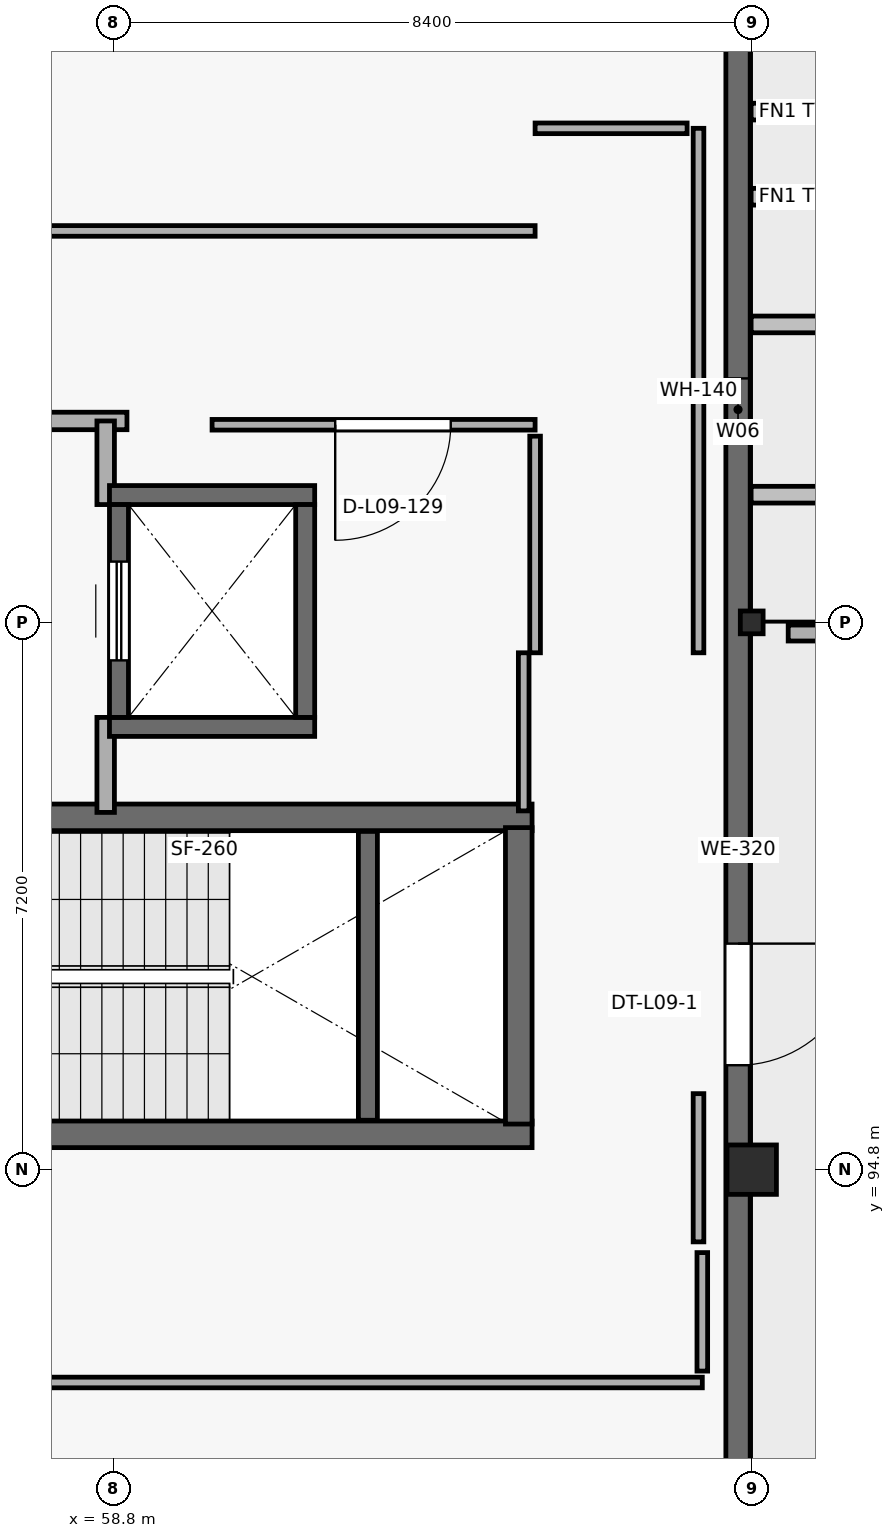
"""IFC4 building model, lengths in metres.
Left out: names, types, materials, properties, quantities, classifications, styles, units other than length and angle.
Written with IfcOpenShell. Run it as: python <this file> out.ifc"""

import sys

from ifc_helpers import new_model, si_unit, direction, frame, frame_2d, origin, origin_2d, place, context, subcontext, project, spatial, rectangle, hollow_rectangle, extrude, element, fill, save


model = new_model("IFC4")
c1 = context("Model", 3, precision=1e-05, world=origin(), true_north=direction((0.0, 1.0)))
c2 = subcontext(c1, "Body", "Model", "MODEL_VIEW")
j1 = project(units=[si_unit("LENGTHUNIT", "METRE"), si_unit("PLANEANGLEUNIT", "RADIAN")], contexts=[c1])
p1 = place(None, origin())
s1 = spatial("IfcSite", under=j1, at=p1, CompositionType="ELEMENT")
p2 = place(p1, origin())
s2 = spatial("IfcBuilding", under=s1, at=p2, CompositionType="ELEMENT")
p3 = place(p2, frame((0.0, 0.0, 40.2)))
s3 = spatial("IfcBuildingStorey", under=s2, at=p3, CompositionType="ELEMENT", Elevation=40.2)
p4 = place(p3, frame((67.2, 94.8, 0.0), z_axis=(0.0, 0.0, 1.0), x_axis=(1.0, 0.0, 0.0)))
e1 = element("IfcColumn", 1, at=p4, inside=s3, PredefinedType="COLUMN", context=c2, shape_type="SweptSolid", body=[
    extrude(rectangle(XDim=0.65, YDim=0.65, at=origin_2d()), origin(), (0.0, 0.0, 1.0), 4.5),
])
p5 = place(p3, frame((67.2, 102.0, 0.0), z_axis=(0.0, 0.0, 1.0), x_axis=(1.0, 0.0, 0.0)))
e2 = element("IfcColumn", 2, at=p5, inside=s3, PredefinedType="COLUMN", context=c2, shape_type="SweptSolid", body=[
    extrude(hollow_rectangle(XDim=0.3, YDim=0.3, WallThickness=0.012, at=origin_2d()), origin(), (0.0, 0.0, 1.0), 4.5),
])
p6 = place(p3, frame((67.02, 110.4, 0.0), z_axis=(0.0, 0.0, 1.0), x_axis=(0.0, -1.0, 0.0)))
e3 = element("IfcWall", 3, at=p6, inside=s3, PredefinedType="SOLIDWALL", context=c2, shape_type="SweptSolid", body=[
    extrude(rectangle(XDim=22.8, YDim=0.32, at=frame_2d((11.4, 0.0))), origin(), (0.0, 0.0, 1.0), 4.24),
])
p7 = place(p6, frame((12.626, 0.0, 0.0)))
e4 = element("IfcOpeningElement", 4, at=p7, cuts=e3, PredefinedType="OPENING", context=c2, shape_type="SweptSolid", body=[
    extrude(rectangle(XDim=1.6, YDim=2.35, at=frame_2d((0.8, 1.175))), frame((0.0, 0.17, 0.0), z_axis=(0.0, -1.0, 0.0), x_axis=(1.0, 0.0, 0.0)), (0.0, 0.0, 1.0), 0.34),
])
p8 = place(p6, frame((5.19, 0.0, 0.75)))
e5 = element("IfcOpeningElement", 5, at=p8, cuts=e3, PredefinedType="OPENING", context=c2, shape_type="SweptSolid", body=[
    extrude(rectangle(XDim=0.82, YDim=1.85, at=frame_2d((0.41, 0.925))), frame((0.0, 0.17, 0.0), z_axis=(0.0, -1.0, 0.0), x_axis=(1.0, 0.0, 0.0)), (0.0, 0.0, 1.0), 0.34),
])
p9 = place(p3, frame((83.87, 101.86, 0.0), z_axis=(0.0, 0.0, 1.0), x_axis=(-1.0, 0.0, 0.0)))
e6 = element("IfcWall", 6, at=p9, inside=s3, PredefinedType="PARAPET", context=c2, shape_type="SweptSolid", body=[
    extrude(rectangle(XDim=16.19, YDim=0.21, at=frame_2d((8.095, 0.0))), origin(), (0.0, 0.0, 1.0), 1.12),
])
p10 = place(p3, frame((55.09, 95.265, 0.0), z_axis=(0.0, 0.0, 1.0), x_axis=(1.0, 0.0, 0.0)))
e7 = element("IfcWall", 7, at=p10, inside=s3, PredefinedType="SHEAR", context=c2, shape_type="SweptSolid", body=[
    extrude(rectangle(XDim=9.22, YDim=0.35, at=frame_2d((4.61, 0.0))), origin(), (0.0, 0.0, 1.0), 4.24),
])
p11 = place(p10, frame((0.45, 0.0, 0.0)))
e8 = element("IfcOpeningElement", 8, at=p11, cuts=e7, PredefinedType="OPENING", context=c2, shape_type="SweptSolid", body=[
    extrude(rectangle(XDim=1.25, YDim=2.2, at=frame_2d((0.625, 1.1))), frame((0.0, 0.185, 0.0), z_axis=(0.0, -1.0, 0.0), x_axis=(1.0, 0.0, 0.0)), (0.0, 0.0, 1.0), 0.37),
])
p12 = place(p3, frame((64.31, 99.435, 0.0), z_axis=(0.0, 0.0, 1.0), x_axis=(-1.0, 0.0, 0.0)))
e9 = element("IfcWall", 9, at=p12, inside=s3, PredefinedType="SHEAR", context=c2, shape_type="SweptSolid", body=[
    extrude(rectangle(XDim=9.22, YDim=0.35, at=frame_2d((4.61, 0.0))), origin(), (0.0, 0.0, 1.0), 4.24),
])
p13 = place(p12, frame((7.72, 0.0, 0.0)))
e10 = element("IfcOpeningElement", 10, at=p13, cuts=e9, PredefinedType="OPENING", context=c2, shape_type="SweptSolid", body=[
    extrude(rectangle(XDim=1.2, YDim=2.2, at=frame_2d((0.6, 1.1))), frame((0.0, 0.185, 0.0), z_axis=(0.0, -1.0, 0.0), x_axis=(1.0, 0.0, 0.0)), (0.0, 0.0, 1.0), 0.37),
])
p14 = place(p3, frame((64.135, 99.3, 0.0), z_axis=(0.0, 0.0, 1.0), x_axis=(0.0, -1.0, 0.0)))
e11 = element("IfcWall", 11, at=p14, inside=s3, PredefinedType="SHEAR", context=c2, shape_type="SweptSolid", body=[
    extrude(rectangle(XDim=3.9, YDim=0.35, at=frame_2d((1.95, 0.0))), origin(), (0.0, 0.0, 1.0), 4.24),
])
p15 = place(p3, frame((62.15, 95.45, 0.0), z_axis=(0.0, 0.0, 1.0), x_axis=(0.0, 1.0, 0.0)))
e12 = element("IfcWall", 12, at=p15, inside=s3, PredefinedType="SHEAR", context=c2, shape_type="SweptSolid", body=[
    extrude(rectangle(XDim=3.8, YDim=0.25, at=frame_2d((1.9, 0.0))), origin(), (0.0, 0.0, 1.0), 2.07),
])
p16 = place(p3, frame((55.09, 104.65, 0.0), z_axis=(0.0, 0.0, 1.0), x_axis=(1.0, 0.0, 0.0)))
e13 = element("IfcWall", 13, at=p16, inside=s3, PredefinedType="PARTITIONING", context=c2, shape_type="SweptSolid", body=[
    extrude(rectangle(XDim=3.89, YDim=0.23, at=frame_2d((1.945, 0.0))), origin(), (0.0, 0.0, 1.0), 4.24),
])
p17 = place(p16, frame((1.15, 0.0, 0.0)))
e14 = element("IfcOpeningElement", 14, at=p17, cuts=e13, PredefinedType="OPENING", context=c2, shape_type="SweptSolid", body=[
    extrude(rectangle(XDim=1.2, YDim=2.2, at=frame_2d((0.6, 1.1))), frame((0.0, 0.125, 0.0), z_axis=(0.0, -1.0, 0.0), x_axis=(1.0, 0.0, 0.0)), (0.0, 0.0, 1.0), 0.25),
])
p18 = place(p3, frame((58.7, 104.65, 0.0), z_axis=(0.0, 0.0, 1.0), x_axis=(0.0, -1.0, 0.0)))
e15 = element("IfcWall", 15, at=p18, inside=s3, PredefinedType="PARTITIONING", context=c2, shape_type="SweptSolid", body=[
    extrude(rectangle(XDim=1.1, YDim=0.23, at=frame_2d((0.55, 0.0))), origin(), (0.0, 0.0, 1.0), 4.24),
])
p19 = place(p3, frame((58.7, 100.75, 0.0), z_axis=(0.0, 0.0, 1.0), x_axis=(0.0, -1.0, 0.0)))
e16 = element("IfcWall", 16, at=p19, inside=s3, PredefinedType="PARTITIONING", context=c2, shape_type="SweptSolid", body=[
    extrude(rectangle(XDim=1.25, YDim=0.23, at=frame_2d((0.625, 0.0))), origin(), (0.0, 0.0, 1.0), 4.24),
])
for number, where, z_axis, x_axis in (
    (17, (58.75, 100.625, 0.0), (0.0, 0.0, 1.0), (1.0, 0.0, 0.0)),
    (18, (61.45, 103.675, 0.0), (0.0, 0.0, 1.0), (-1.0, 0.0, 0.0)),
):
    element("IfcWall", number, at=place(p3, frame(where, z_axis=z_axis, x_axis=x_axis)), inside=s3, PredefinedType="SHEAR", context=c2, shape_type="SweptSolid", body=[
        extrude(rectangle(XDim=2.7, YDim=0.25, at=frame_2d((1.35, 0.0))), origin(), (0.0, 0.0, 1.0), 4.24),
    ])
p20 = place(p3, frame((58.875, 100.75, 0.0), z_axis=(0.0, 0.0, 1.0), x_axis=(0.0, 1.0, 0.0)))
e19 = element("IfcWall", 19, at=p20, inside=s3, PredefinedType="SHEAR", context=c2, shape_type="SweptSolid", body=[
    extrude(rectangle(XDim=2.8, YDim=0.25, at=frame_2d((1.4, 0.0))), origin(), (0.0, 0.0, 1.0), 4.24),
])
p21 = place(p20, frame((0.75, 0.0, 0.0)))
e20 = element("IfcOpeningElement", 20, at=p21, cuts=e19, PredefinedType="OPENING", context=c2, shape_type="SweptSolid", body=[
    extrude(rectangle(XDim=1.3, YDim=2.25, at=frame_2d((0.65, 1.125))), frame((0.0, 0.135, 0.0), z_axis=(0.0, -1.0, 0.0), x_axis=(1.0, 0.0, 0.0)), (0.0, 0.0, 1.0), 0.27),
])
p22 = place(p3, frame((61.325, 103.55, 0.0), z_axis=(0.0, 0.0, 1.0), x_axis=(0.0, -1.0, 0.0)))
e21 = element("IfcWall", 21, at=p22, inside=s3, PredefinedType="SHEAR", context=c2, shape_type="SweptSolid", body=[
    extrude(rectangle(XDim=2.8, YDim=0.25, at=frame_2d((1.4, 0.0))), origin(), (0.0, 0.0, 1.0), 4.24),
])
p23 = place(p3, frame((34.4, 92.0, 0.0), z_axis=(0.0, 0.0, 1.0), x_axis=(1.0, 0.0, 0.0)))
e22 = element("IfcWall", 22, at=p23, inside=s3, PredefinedType="PARTITIONING", context=c2, shape_type="SweptSolid", body=[
    extrude(rectangle(XDim=32.15, YDim=0.14, at=frame_2d((16.075, 0.0))), origin(), (0.0, 0.0, 1.0), 4.24),
])
p24 = place(p23, frame((15.555, 0.0, 0.0)))
e23 = element("IfcOpeningElement", 23, at=p24, cuts=e22, PredefinedType="OPENING", context=c2, shape_type="SweptSolid", body=[
    extrude(rectangle(XDim=1.04, YDim=2.26, at=frame_2d((0.52, 1.13))), frame((0.0, 0.08, 0.0), z_axis=(0.0, -1.0, 0.0), x_axis=(1.0, 0.0, 0.0)), (0.0, 0.0, 1.0), 0.16),
])
p25 = place(p3, frame((64.35, 107.15, 0.0), z_axis=(0.0, 0.0, 1.0), x_axis=(-1.0, 0.0, 0.0)))
e24 = element("IfcWall", 24, at=p25, inside=s3, PredefinedType="PARTITIONING", context=c2, shape_type="SweptSolid", body=[
    extrude(rectangle(XDim=12.0, YDim=0.14, at=frame_2d((6.0, 0.0))), origin(), (0.0, 0.0, 1.0), 4.24),
])
p26 = place(p3, frame((66.5, 101.6, 0.0), z_axis=(0.0, 0.0, 1.0), x_axis=(0.0, 1.0, 0.0)))
e25 = element("IfcWall", 25, at=p26, inside=s3, PredefinedType="PARTITIONING", context=c2, shape_type="SweptSolid", body=[
    extrude(rectangle(XDim=6.9, YDim=0.14, at=frame_2d((3.45, 0.0))), origin(), (0.0, 0.0, 1.0), 4.24),
])
p27 = place(p3, frame((60.1, 104.6, 0.0), z_axis=(0.0, 0.0, 1.0), x_axis=(1.0, 0.0, 0.0)))
e26 = element("IfcWall", 26, at=p27, inside=s3, PredefinedType="PARTITIONING", context=c2, shape_type="SweptSolid", body=[
    extrude(rectangle(XDim=4.25, YDim=0.14, at=frame_2d((2.125, 0.0))), origin(), (0.0, 0.0, 1.0), 4.24),
])
p28 = place(p27, frame((1.62, 0.0, 0.0)))
e27 = element("IfcOpeningElement", 27, at=p28, cuts=e26, PredefinedType="OPENING", context=c2, shape_type="SweptSolid", body=[
    extrude(rectangle(XDim=1.52, YDim=2.4, at=frame_2d((0.76, 1.2))), frame((0.0, 0.08, 0.0), z_axis=(0.0, -1.0, 0.0), x_axis=(1.0, 0.0, 0.0)), (0.0, 0.0, 1.0), 0.16),
])
p29 = place(p3, frame((64.35, 104.45, 0.0), z_axis=(0.0, 0.0, 1.0), x_axis=(0.0, -1.0, 0.0)))
e28 = element("IfcWall", 28, at=p29, inside=s3, PredefinedType="PARTITIONING", context=c2, shape_type="SweptSolid", body=[
    extrude(rectangle(XDim=2.85, YDim=0.14, at=frame_2d((1.425, 0.0))), origin(), (0.0, 0.0, 1.0), 4.24),
])
p30 = place(p3, frame((66.35, 108.5, 0.0), z_axis=(0.0, 0.0, 1.0), x_axis=(-1.0, 0.0, 0.0)))
e29 = element("IfcWall", 29, at=p30, inside=s3, PredefinedType="PARTITIONING", context=c2, shape_type="SweptSolid", body=[
    extrude(rectangle(XDim=2.0, YDim=0.14, at=frame_2d((1.0, 0.0))), origin(), (0.0, 0.0, 1.0), 4.24),
])
p31 = place(p3, frame((64.2, 101.6, 0.0), z_axis=(0.0, 0.0, 1.0), x_axis=(0.0, -1.0, 0.0)))
e30 = element("IfcWall", 30, at=p31, inside=s3, PredefinedType="PARTITIONING", context=c2, shape_type="SweptSolid", body=[
    extrude(rectangle(XDim=2.08, YDim=0.14, at=frame_2d((1.04, 0.0))), origin(), (0.0, 0.0, 1.0), 4.24),
])
p32 = place(p3, frame((66.5, 93.85, 0.0), z_axis=(0.0, 0.0, 1.0), x_axis=(0.0, 1.0, 0.0)))
e31 = element("IfcWall", 31, at=p32, inside=s3, PredefinedType="PARTITIONING", context=c2, shape_type="SweptSolid", body=[
    extrude(rectangle(XDim=1.95, YDim=0.14, at=frame_2d((0.975, 0.0))), origin(), (0.0, 0.0, 1.0), 4.24),
])
p33 = place(p3, frame((66.55, 92.15, 0.0), z_axis=(0.0, 0.0, 1.0), x_axis=(0.0, 1.0, 0.0)))
e32 = element("IfcWall", 32, at=p33, inside=s3, PredefinedType="PARTITIONING", context=c2, shape_type="SweptSolid", body=[
    extrude(rectangle(XDim=1.559, YDim=0.14, at=frame_2d((0.779, 0.0))), origin(), (0.0, 0.0, 1.0), 4.24),
])
p34 = place(p7, origin())
e33 = element("IfcDoor", 33, at=p34, inside=s3, OperationType="SINGLE_SWING_LEFT", PredefinedType="DOOR", context=c2, shape_type="SweptSolid", body=[
    extrude(rectangle(XDim=1.6, YDim=2.35, at=frame_2d((0.8, 1.175))), frame((0.0, 0.025, 0.0), z_axis=(0.0, -1.0, 0.0), x_axis=(1.0, 0.0, 0.0)), (0.0, 0.0, 1.0), 0.05),
])
fill(e4, e33)
p35 = place(p8, origin())
e34 = element("IfcWindow", 34, at=p35, inside=s3, PartitioningType="SINGLE_PANEL", PredefinedType="WINDOW", context=c2, shape_type="SweptSolid", body=[
    extrude(rectangle(XDim=0.82, YDim=1.85, at=frame_2d((0.41, 0.925))), frame((0.0, 0.03, 0.0), z_axis=(0.0, -1.0, 0.0), x_axis=(1.0, 0.0, 0.0)), (0.0, 0.0, 1.0), 0.06),
])
fill(e5, e34)
p36 = place(p21, origin())
e35 = element("IfcDoor", 35, at=p36, inside=s3, OperationType="SLIDING_TO_RIGHT", PredefinedType="DOOR", context=c2, shape_type="SweptSolid", body=[
    extrude(rectangle(XDim=1.3, YDim=2.25, at=frame_2d((0.65, 1.125))), frame((0.0, 0.025, 0.0), z_axis=(0.0, -1.0, 0.0), x_axis=(1.0, 0.0, 0.0)), (0.0, 0.0, 1.0), 0.05),
])
fill(e20, e35)
p37 = place(p28, origin())
e36 = element("IfcDoor", 36, at=p37, inside=s3, OperationType="SINGLE_SWING_RIGHT", PredefinedType="DOOR", context=c2, shape_type="SweptSolid", body=[
    extrude(rectangle(XDim=1.52, YDim=2.4, at=frame_2d((0.76, 1.2))), frame((0.0, 0.025, 0.0), z_axis=(0.0, -1.0, 0.0), x_axis=(1.0, 0.0, 0.0)), (0.0, 0.0, 1.0), 0.05),
])
fill(e27, e36)
save(model, sys.argv[1])
